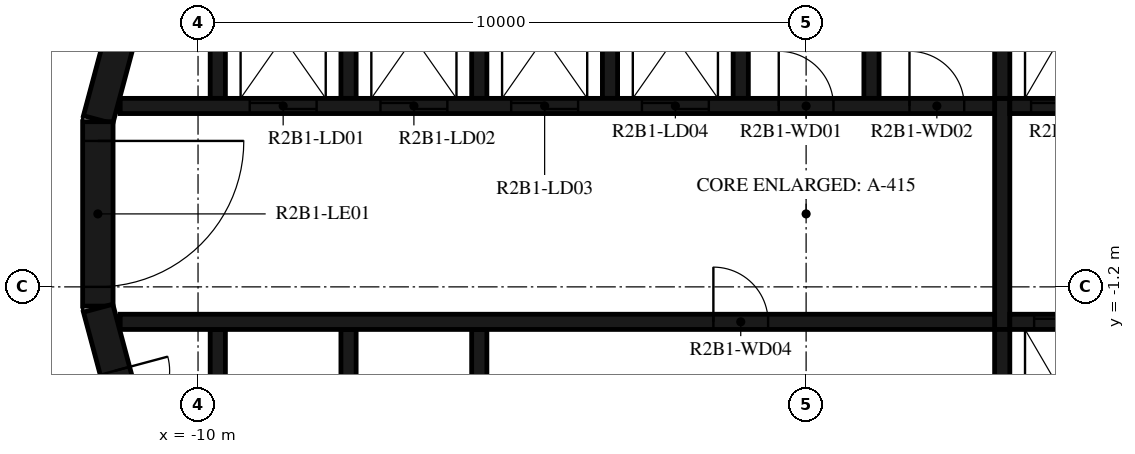
"""IFC4 building model, lengths in metres.
Left out: names, types, materials, properties, quantities, classifications, styles, units other than length and angle.
Written with IfcOpenShell. Run it as: python <this file> out.ifc"""

import sys

from ifc_helpers import new_model, si_unit, direction, frame, frame_2d, origin, place, context, subcontext, project, spatial, polyline, rectangle, outline, extrude, element, fill, save


model = new_model("IFC4")
c1 = context("Model", 3, precision=1e-05, world=origin(), true_north=direction((0.0, 1.0)))
c2 = subcontext(c1, "Body", "Model", "MODEL_VIEW")
j1 = project(units=[si_unit("LENGTHUNIT", "METRE"), si_unit("PLANEANGLEUNIT", "RADIAN")], contexts=[c1])
p1 = place(None, origin())
s1 = spatial("IfcSite", under=j1, at=p1, CompositionType="ELEMENT")
p2 = place(p1, origin())
s2 = spatial("IfcBuilding", under=s1, at=p2, CompositionType="ELEMENT")
p3 = place(p2, frame((0.0, 0.0, 87.2)))
s3 = spatial("IfcBuildingStorey", under=s2, at=p3, CompositionType="ELEMENT", Elevation=87.2)
p4 = place(p3, frame((-10.858, 4.479, 0.0), z_axis=(0.0, 0.0, 1.0), x_axis=(-0.258734743916, -0.965948410781, 0.0)))
e1 = element("IfcWall", 1, at=p4, inside=s3, PredefinedType="SHEAR", context=c2, shape_type="SweptSolid", body=[
    extrude(rectangle(XDim=3.033, YDim=0.5, at=frame_2d((1.516, 0.0))), origin(), (0.0, 0.0, 1.0), 3.12),
])
p5 = place(p3, frame((-11.647, 1.516, 0.0), z_axis=(0.0, 0.0, 1.0), x_axis=(0.0, -1.0, 0.0)))
e2 = element("IfcWall", 2, at=p5, inside=s3, PredefinedType="SHEAR", context=c2, shape_type="SweptSolid", body=[
    extrude(rectangle(XDim=3.033, YDim=0.5, at=frame_2d((1.516, 0.0))), origin(), (0.0, 0.0, 1.0), 3.12),
])
p6 = place(p5, frame((0.316, 0.0, 0.0)))
e3 = element("IfcOpeningElement", 3, at=p6, cuts=e2, PredefinedType="OPENING", context=c2, shape_type="SweptSolid", body=[
    extrude(rectangle(XDim=2.4, YDim=2.1, at=frame_2d((1.2, 1.05))), frame((0.0, 0.26, 0.0), z_axis=(0.0, -1.0, 0.0), x_axis=(1.0, 0.0, 0.0)), (0.0, 0.0, 1.0), 0.52),
])
p7 = place(p3, frame((-11.643, -1.55, 0.0), z_axis=(0.0, 0.0, 1.0), x_axis=(0.258734743916, -0.965948410781, 0.0)))
e4 = element("IfcWall", 4, at=p7, inside=s3, PredefinedType="SHEAR", context=c2, shape_type="SweptSolid", body=[
    extrude(rectangle(XDim=3.033, YDim=0.5, at=frame_2d((1.516, 0.0))), origin(), (0.0, 0.0, 1.0), 3.12),
])
p8 = place(p7, frame((1.066, 0.0, 0.0)))
e5 = element("IfcOpeningElement", 5, at=p8, cuts=e4, PredefinedType="OPENING", context=c2, shape_type="SweptSolid", body=[
    extrude(rectangle(XDim=0.9, YDim=2.1, at=frame_2d((0.45, 1.05))), frame((0.0, 0.26, 0.0), z_axis=(0.0, -1.0, 0.0), x_axis=(1.0, 0.0, 0.0)), (0.0, 0.0, 1.0), 0.52),
])
p9 = place(p3, origin())
e6 = element("IfcWall", 6, at=p9, inside=s3, PredefinedType="SHEAR", context=c2, shape_type="SweptSolid", body=[
    extrude(outline(polyline([(-9.55, 4.8), (-7.65, 4.8), (-7.65, 1.9), (-7.4, 1.9), (-7.4, 4.8), (-5.5, 4.8), (-5.5, 1.9), (-5.25, 1.9), (-5.25, 4.8), (-3.35, 4.8), (-3.35, 1.9), (-3.1, 1.9), (-3.1, 4.8), (-1.2, 4.8), (-1.2, 1.9), (-0.95, 1.9), (-0.95, 4.8), (0.95, 4.8), (0.95, 1.9), (1.2, 1.9), (1.2, 4.8), (3.1, 4.8), (3.1, 1.9), (3.35, 1.9), (3.35, 4.8), (5.25, 4.8), (5.25, 1.9), (5.5, 1.9), (5.5, 4.8), (7.4, 4.8), (7.4, 1.9), (7.65, 1.9), (7.65, 4.8), (9.55, 4.8), (9.55, 1.9), (9.8, 1.9), (9.8, 4.8), (9.8, 5.05), (-9.8, 5.05), (-9.8, 4.8), (-9.8, 1.9), (-9.55, 1.9), (-9.55, 4.8)])), origin(), (0.0, 0.0, 1.0), 3.12),
])
p10 = place(p3, origin())
e7 = element("IfcWall", 7, at=p10, inside=s3, PredefinedType="SHEAR", context=c2, shape_type="SweptSolid", body=[
    extrude(outline(polyline([(9.8, -5.05), (9.8, -4.8), (9.8, -1.9), (9.55, -1.9), (9.55, -4.8), (7.65, -4.8), (7.65, -1.9), (7.4, -1.9), (7.4, -4.8), (5.5, -4.8), (5.5, -1.9), (5.25, -1.9), (5.25, -4.8), (3.35, -4.8), (3.35, -1.9), (3.1, -1.9), (3.1, -4.8), (-5.25, -4.8), (-5.25, -1.9), (-5.5, -1.9), (-5.5, -4.8), (-7.4, -4.8), (-7.4, -1.9), (-7.65, -1.9), (-7.65, -4.8), (-9.55, -4.8), (-9.55, -1.9), (-9.8, -1.9), (-9.8, -4.8), (-9.8, -5.05), (9.8, -5.05)])), origin(), (0.0, 0.0, 1.0), 3.12),
])
p11 = place(p3, frame((-11.28, 1.775, 0.0), z_axis=(0.0, 0.0, 1.0), x_axis=(1.0, 0.0, 0.0)))
e8 = element("IfcWall", 8, at=p11, inside=s3, PredefinedType="SHEAR", context=c2, shape_type="SweptSolid", body=[
    extrude(rectangle(XDim=14.38, YDim=0.25, at=frame_2d((7.19, 0.0))), origin(), (0.0, 0.0, 1.0), 3.12),
])
p12 = place(p11, frame((2.13, 0.0, 0.0)))
e9 = element("IfcOpeningElement", 9, at=p12, cuts=e8, PredefinedType="OPENING", context=c2, shape_type="SweptSolid", body=[
    extrude(rectangle(XDim=1.1, YDim=2.1, at=frame_2d((0.55, 1.05))), frame((0.0, 0.135, 0.0), z_axis=(0.0, -1.0, 0.0), x_axis=(1.0, 0.0, 0.0)), (0.0, 0.0, 1.0), 0.27),
])
p13 = place(p11, frame((4.28, 0.0, 0.0)))
e10 = element("IfcOpeningElement", 10, at=p13, cuts=e8, PredefinedType="OPENING", context=c2, shape_type="SweptSolid", body=[
    extrude(rectangle(XDim=1.1, YDim=2.1, at=frame_2d((0.55, 1.05))), frame((0.0, 0.135, 0.0), z_axis=(0.0, -1.0, 0.0), x_axis=(1.0, 0.0, 0.0)), (0.0, 0.0, 1.0), 0.27),
])
p14 = place(p11, frame((6.43, 0.0, 0.0)))
e11 = element("IfcOpeningElement", 11, at=p14, cuts=e8, PredefinedType="OPENING", context=c2, shape_type="SweptSolid", body=[
    extrude(rectangle(XDim=1.1, YDim=2.1, at=frame_2d((0.55, 1.05))), frame((0.0, 0.135, 0.0), z_axis=(0.0, -1.0, 0.0), x_axis=(1.0, 0.0, 0.0)), (0.0, 0.0, 1.0), 0.27),
])
p15 = place(p11, frame((8.58, 0.0, 0.0)))
e12 = element("IfcOpeningElement", 12, at=p15, cuts=e8, PredefinedType="OPENING", context=c2, shape_type="SweptSolid", body=[
    extrude(rectangle(XDim=1.1, YDim=2.1, at=frame_2d((0.55, 1.05))), frame((0.0, 0.135, 0.0), z_axis=(0.0, -1.0, 0.0), x_axis=(1.0, 0.0, 0.0)), (0.0, 0.0, 1.0), 0.27),
])
p16 = place(p11, frame((10.83, 0.0, 0.0)))
e13 = element("IfcOpeningElement", 13, at=p16, cuts=e8, PredefinedType="OPENING", context=c2, shape_type="SweptSolid", body=[
    extrude(rectangle(XDim=0.9, YDim=2.1, at=frame_2d((0.45, 1.05))), frame((0.0, 0.135, 0.0), z_axis=(0.0, -1.0, 0.0), x_axis=(1.0, 0.0, 0.0)), (0.0, 0.0, 1.0), 0.27),
])
p17 = place(p11, frame((12.98, 0.0, 0.0)))
e14 = element("IfcOpeningElement", 14, at=p17, cuts=e8, PredefinedType="OPENING", context=c2, shape_type="SweptSolid", body=[
    extrude(rectangle(XDim=0.9, YDim=2.1, at=frame_2d((0.45, 1.05))), frame((0.0, 0.135, 0.0), z_axis=(0.0, -1.0, 0.0), x_axis=(1.0, 0.0, 0.0)), (0.0, 0.0, 1.0), 0.27),
])
p18 = place(p3, frame((3.35, 1.775, 0.0), z_axis=(0.0, 0.0, 1.0), x_axis=(1.0, 0.0, 0.0)))
e15 = element("IfcWall", 15, at=p18, inside=s3, PredefinedType="SHEAR", context=c2, shape_type="SweptSolid", body=[
    extrude(rectangle(XDim=7.93, YDim=0.25, at=frame_2d((3.965, 0.0))), origin(), (0.0, 0.0, 1.0), 3.12),
])
p19 = place(p18, frame((0.35, 0.0, 0.0)))
e16 = element("IfcOpeningElement", 16, at=p19, cuts=e15, PredefinedType="OPENING", context=c2, shape_type="SweptSolid", body=[
    extrude(rectangle(XDim=1.2, YDim=2.4, at=frame_2d((0.6, 1.2))), frame((0.0, 0.135, 0.0), z_axis=(0.0, -1.0, 0.0), x_axis=(1.0, 0.0, 0.0)), (0.0, 0.0, 1.0), 0.27),
])
p20 = place(p18, frame((2.5, 0.0, 0.0)))
e17 = element("IfcOpeningElement", 17, at=p20, cuts=e15, PredefinedType="OPENING", context=c2, shape_type="SweptSolid", body=[
    extrude(rectangle(XDim=1.2, YDim=2.4, at=frame_2d((0.6, 1.2))), frame((0.0, 0.135, 0.0), z_axis=(0.0, -1.0, 0.0), x_axis=(1.0, 0.0, 0.0)), (0.0, 0.0, 1.0), 0.27),
])
p21 = place(p18, frame((4.8, 0.0, 0.0)))
e18 = element("IfcOpeningElement", 18, at=p21, cuts=e15, PredefinedType="OPENING", context=c2, shape_type="SweptSolid", body=[
    extrude(rectangle(XDim=0.9, YDim=2.1, at=frame_2d((0.45, 1.05))), frame((0.0, 0.135, 0.0), z_axis=(0.0, -1.0, 0.0), x_axis=(1.0, 0.0, 0.0)), (0.0, 0.0, 1.0), 0.27),
])
p22 = place(p3, frame((-11.28, -1.775, 0.0), z_axis=(0.0, 0.0, 1.0), x_axis=(1.0, 0.0, 0.0)))
e19 = element("IfcWall", 19, at=p22, inside=s3, PredefinedType="SHEAR", context=c2, shape_type="SweptSolid", body=[
    extrude(rectangle(XDim=14.38, YDim=0.25, at=frame_2d((7.19, 0.0))), origin(), (0.0, 0.0, 1.0), 3.12),
])
p23 = place(p22, frame((9.755, 0.0, 0.0)))
e20 = element("IfcOpeningElement", 20, at=p23, cuts=e19, PredefinedType="OPENING", context=c2, shape_type="SweptSolid", body=[
    extrude(rectangle(XDim=0.9, YDim=2.1, at=frame_2d((0.45, 1.05))), frame((0.0, 0.135, 0.0), z_axis=(0.0, -1.0, 0.0), x_axis=(1.0, 0.0, 0.0)), (0.0, 0.0, 1.0), 0.27),
])
p24 = place(p3, frame((3.35, -1.775, 0.0), z_axis=(0.0, 0.0, 1.0), x_axis=(1.0, 0.0, 0.0)))
e21 = element("IfcWall", 21, at=p24, inside=s3, PredefinedType="SHEAR", context=c2, shape_type="SweptSolid", body=[
    extrude(rectangle(XDim=7.93, YDim=0.25, at=frame_2d((3.965, 0.0))), origin(), (0.0, 0.0, 1.0), 3.12),
])
p25 = place(p24, frame((0.4, 0.0, 0.0)))
e22 = element("IfcOpeningElement", 22, at=p25, cuts=e21, PredefinedType="OPENING", context=c2, shape_type="SweptSolid", body=[
    extrude(rectangle(XDim=1.1, YDim=2.4, at=frame_2d((0.55, 1.2))), frame((0.0, 0.135, 0.0), z_axis=(0.0, -1.0, 0.0), x_axis=(1.0, 0.0, 0.0)), (0.0, 0.0, 1.0), 0.27),
])
p26 = place(p24, frame((2.55, 0.0, 0.0)))
e23 = element("IfcOpeningElement", 23, at=p26, cuts=e21, PredefinedType="OPENING", context=c2, shape_type="SweptSolid", body=[
    extrude(rectangle(XDim=1.1, YDim=2.4, at=frame_2d((0.55, 1.2))), frame((0.0, 0.135, 0.0), z_axis=(0.0, -1.0, 0.0), x_axis=(1.0, 0.0, 0.0)), (0.0, 0.0, 1.0), 0.27),
])
p27 = place(p24, frame((4.7, 0.0, 0.0)))
e24 = element("IfcOpeningElement", 24, at=p27, cuts=e21, PredefinedType="OPENING", context=c2, shape_type="SweptSolid", body=[
    extrude(rectangle(XDim=1.1, YDim=2.4, at=frame_2d((0.55, 1.2))), frame((0.0, 0.135, 0.0), z_axis=(0.0, -1.0, 0.0), x_axis=(1.0, 0.0, 0.0)), (0.0, 0.0, 1.0), 0.27),
])
p28 = place(p3, frame((3.225, -1.9, 0.0), z_axis=(0.0, 0.0, 1.0), x_axis=(0.0, 1.0, 0.0)))
e25 = element("IfcWall", 25, at=p28, inside=s3, PredefinedType="SHEAR", context=c2, shape_type="SweptSolid", body=[
    extrude(rectangle(XDim=3.8, YDim=0.25, at=frame_2d((1.9, 0.0))), origin(), (0.0, 0.0, 1.0), 3.12),
])
p29 = place(p3, frame((-11.1, 8.829, 0.0), z_axis=(0.0, 0.0, 1.0), x_axis=(-0.398741918631, -0.917063183388, 0.0)))
e26 = element("IfcWall", 26, at=p29, inside=s3, PredefinedType="STANDARD", context=c2, shape_type="SweptSolid", body=[
    extrude(rectangle(XDim=7.342, YDim=0.2, at=frame_2d((3.671, 0.0))), origin(), (0.0, 0.0, 1.0), 3.12),
])
p30 = place(p29, frame((0.2, 0.0, 0.0)))
e27 = element("IfcOpeningElement", 27, at=p30, cuts=e26, PredefinedType="OPENING", context=c2, shape_type="SweptSolid", body=[
    extrude(rectangle(XDim=1.0, YDim=2.1, at=frame_2d((0.5, 1.05))), frame((0.0, 0.11, 0.0), z_axis=(0.0, -1.0, 0.0), x_axis=(1.0, 0.0, 0.0)), (0.0, 0.0, 1.0), 0.22),
])
p31 = place(p6, origin())
e28 = element("IfcDoor", 28, at=p31, inside=s3, OperationType="DOUBLE_DOOR_SINGLE_SWING", PredefinedType="DOOR", context=c2, shape_type="SweptSolid", body=[
    extrude(rectangle(XDim=2.4, YDim=2.1, at=frame_2d((1.2, 1.05))), frame((0.0, 0.025, 0.0), z_axis=(0.0, -1.0, 0.0), x_axis=(1.0, 0.0, 0.0)), (0.0, 0.0, 1.0), 0.05),
])
fill(e3, e28)
p32 = place(p12, origin())
e29 = element("IfcDoor", 29, at=p32, inside=s3, OperationType="DOUBLE_DOOR_SLIDING", PredefinedType="DOOR", context=c2, shape_type="SweptSolid", body=[
    extrude(rectangle(XDim=1.1, YDim=2.1, at=frame_2d((0.55, 1.05))), frame((0.0, 0.025, 0.0), z_axis=(0.0, -1.0, 0.0), x_axis=(1.0, 0.0, 0.0)), (0.0, 0.0, 1.0), 0.05),
])
fill(e9, e29)
p33 = place(p13, origin())
e30 = element("IfcDoor", 30, at=p33, inside=s3, OperationType="DOUBLE_DOOR_SLIDING", PredefinedType="DOOR", context=c2, shape_type="SweptSolid", body=[
    extrude(rectangle(XDim=1.1, YDim=2.1, at=frame_2d((0.55, 1.05))), frame((0.0, 0.025, 0.0), z_axis=(0.0, -1.0, 0.0), x_axis=(1.0, 0.0, 0.0)), (0.0, 0.0, 1.0), 0.05),
])
fill(e10, e30)
p34 = place(p14, origin())
e31 = element("IfcDoor", 31, at=p34, inside=s3, OperationType="DOUBLE_DOOR_SLIDING", PredefinedType="DOOR", context=c2, shape_type="SweptSolid", body=[
    extrude(rectangle(XDim=1.1, YDim=2.1, at=frame_2d((0.55, 1.05))), frame((0.0, 0.025, 0.0), z_axis=(0.0, -1.0, 0.0), x_axis=(1.0, 0.0, 0.0)), (0.0, 0.0, 1.0), 0.05),
])
fill(e11, e31)
p35 = place(p15, origin())
e32 = element("IfcDoor", 32, at=p35, inside=s3, OperationType="DOUBLE_DOOR_SLIDING", PredefinedType="DOOR", context=c2, shape_type="SweptSolid", body=[
    extrude(rectangle(XDim=1.1, YDim=2.1, at=frame_2d((0.55, 1.05))), frame((0.0, 0.025, 0.0), z_axis=(0.0, -1.0, 0.0), x_axis=(1.0, 0.0, 0.0)), (0.0, 0.0, 1.0), 0.05),
])
fill(e12, e32)
p36 = place(p19, origin())
e33 = element("IfcDoor", 33, at=p36, inside=s3, OperationType="DOUBLE_DOOR_SLIDING", PredefinedType="DOOR", context=c2, shape_type="SweptSolid", body=[
    extrude(rectangle(XDim=1.2, YDim=2.4, at=frame_2d((0.6, 1.2))), frame((0.0, 0.025, 0.0), z_axis=(0.0, -1.0, 0.0), x_axis=(1.0, 0.0, 0.0)), (0.0, 0.0, 1.0), 0.05),
])
fill(e16, e33)
p37 = place(p25, origin())
e34 = element("IfcDoor", 34, at=p37, inside=s3, OperationType="DOUBLE_DOOR_SLIDING", PredefinedType="DOOR", context=c2, shape_type="SweptSolid", body=[
    extrude(rectangle(XDim=1.1, YDim=2.4, at=frame_2d((0.55, 1.2))), frame((0.0, 0.025, 0.0), z_axis=(0.0, -1.0, 0.0), x_axis=(1.0, 0.0, 0.0)), (0.0, 0.0, 1.0), 0.05),
])
fill(e22, e34)
p38 = place(p16, origin())
e35 = element("IfcDoor", 35, at=p38, inside=s3, OperationType="SINGLE_SWING_RIGHT", PredefinedType="DOOR", context=c2, shape_type="SweptSolid", body=[
    extrude(rectangle(XDim=0.9, YDim=2.1, at=frame_2d((0.45, 1.05))), frame((0.0, 0.025, 0.0), z_axis=(0.0, -1.0, 0.0), x_axis=(1.0, 0.0, 0.0)), (0.0, 0.0, 1.0), 0.05),
])
fill(e13, e35)
p39 = place(p17, origin())
e36 = element("IfcDoor", 36, at=p39, inside=s3, OperationType="SINGLE_SWING_LEFT", PredefinedType="DOOR", context=c2, shape_type="SweptSolid", body=[
    extrude(rectangle(XDim=0.9, YDim=2.1, at=frame_2d((0.45, 1.05))), frame((0.0, 0.025, 0.0), z_axis=(0.0, -1.0, 0.0), x_axis=(1.0, 0.0, 0.0)), (0.0, 0.0, 1.0), 0.05),
])
fill(e14, e36)
p40 = place(p23, origin())
e37 = element("IfcDoor", 37, at=p40, inside=s3, OperationType="SINGLE_SWING_LEFT", PredefinedType="DOOR", context=c2, shape_type="SweptSolid", body=[
    extrude(rectangle(XDim=0.9, YDim=2.1, at=frame_2d((0.45, 1.05))), frame((0.0, 0.025, 0.0), z_axis=(0.0, -1.0, 0.0), x_axis=(1.0, 0.0, 0.0)), (0.0, 0.0, 1.0), 0.05),
])
fill(e20, e37)
p41 = place(p8, origin())
e38 = element("IfcDoor", 38, at=p41, inside=s3, OperationType="SINGLE_SWING_RIGHT", PredefinedType="DOOR", context=c2, shape_type="SweptSolid", body=[
    extrude(rectangle(XDim=0.9, YDim=2.1, at=frame_2d((0.45, 1.05))), frame((0.0, 0.025, 0.0), z_axis=(0.0, -1.0, 0.0), x_axis=(1.0, 0.0, 0.0)), (0.0, 0.0, 1.0), 0.05),
])
fill(e5, e38)
save(model, sys.argv[1])
